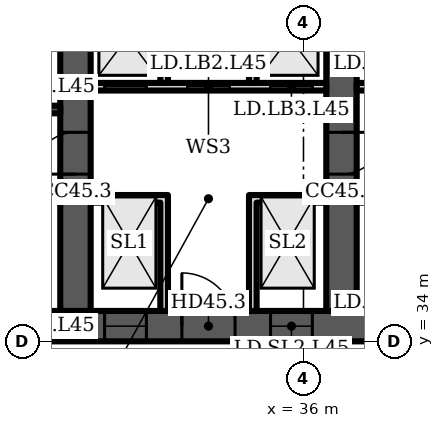
"""IFC4 building model, lengths in metres.
Left out: names, types, materials, properties, quantities, classifications, styles, units other than length and angle.
Written with IfcOpenShell. Run it as: python <this file> out.ifc"""

import sys

from ifc_helpers import new_model, si_unit, direction, frame, frame_2d, origin, place, context, subcontext, project, spatial, polyline, rectangle, outline, extrude, element, fill, save


model = new_model("IFC4")
c1 = context("Model", 3, precision=1e-05, world=origin(), true_north=direction((0.0, 1.0)))
c2 = subcontext(c1, "Body", "Model", "MODEL_VIEW")
j1 = project(units=[si_unit("LENGTHUNIT", "METRE"), si_unit("PLANEANGLEUNIT", "RADIAN")], contexts=[c1])
p1 = place(None, origin())
s1 = spatial("IfcSite", under=j1, at=p1, CompositionType="ELEMENT")
p2 = place(p1, origin())
s2 = spatial("IfcBuilding", under=s1, at=p2, CompositionType="ELEMENT")
p3 = place(p2, frame((0.0, 0.0, 184.3)))
s3 = spatial("IfcBuildingStorey", under=s2, at=p3, CompositionType="ELEMENT", Elevation=184.3)
p4 = place(p3, frame((16.0, 34.4, 0.0), z_axis=(0.0, 0.0, 1.0), x_axis=(1.0, 0.0, 0.0)))
e1 = element("IfcWall", 1, at=p4, inside=s3, PredefinedType="SHEAR", context=c2, shape_type="SweptSolid", body=[
    extrude(rectangle(XDim=42.0, YDim=0.8, at=frame_2d((21.0, 0.0))), origin(), (0.0, 0.0, 1.0), 3.6),
])
p5 = place(p4, frame((1.75, 0.0, 0.0)))
e2 = element("IfcOpeningElement", 2, at=p5, cuts=e1, PredefinedType="OPENING", context=c2, shape_type="SweptSolid", body=[
    extrude(rectangle(XDim=1.0, YDim=2.1, at=frame_2d((0.5, 1.05))), frame((0.0, 0.41, 0.0), z_axis=(0.0, -1.0, 0.0), x_axis=(1.0, 0.0, 0.0)), (0.0, 0.0, 1.0), 0.82),
])
p6 = place(p4, frame((4.65, 0.0, 0.0)))
e3 = element("IfcOpeningElement", 3, at=p6, cuts=e1, PredefinedType="OPENING", context=c2, shape_type="SweptSolid", body=[
    extrude(rectangle(XDim=1.0, YDim=2.1, at=frame_2d((0.5, 1.05))), frame((0.0, 0.41, 0.0), z_axis=(0.0, -1.0, 0.0), x_axis=(1.0, 0.0, 0.0)), (0.0, 0.0, 1.0), 0.82),
])
p7 = place(p4, frame((7.65, 0.0, 0.0)))
e4 = element("IfcOpeningElement", 4, at=p7, cuts=e1, PredefinedType="OPENING", context=c2, shape_type="SweptSolid", body=[
    extrude(rectangle(XDim=1.2, YDim=2.1, at=frame_2d((0.6, 1.05))), frame((0.0, 0.41, 0.0), z_axis=(0.0, -1.0, 0.0), x_axis=(1.0, 0.0, 0.0)), (0.0, 0.0, 1.0), 0.82),
])
p8 = place(p4, frame((14.767, 0.0, 0.0)))
e5 = element("IfcOpeningElement", 5, at=p8, cuts=e1, PredefinedType="OPENING", context=c2, shape_type="SweptSolid", body=[
    extrude(rectangle(XDim=1.1, YDim=2.1, at=frame_2d((0.55, 1.05))), frame((0.0, 0.41, 0.0), z_axis=(0.0, -1.0, 0.0), x_axis=(1.0, 0.0, 0.0)), (0.0, 0.0, 1.0), 0.82),
])
p9 = place(p4, frame((19.133, 0.0, 0.0)))
e6 = element("IfcOpeningElement", 6, at=p9, cuts=e1, PredefinedType="OPENING", context=c2, shape_type="SweptSolid", body=[
    extrude(rectangle(XDim=1.1, YDim=2.1, at=frame_2d((0.55, 1.05))), frame((0.0, 0.41, 0.0), z_axis=(0.0, -1.0, 0.0), x_axis=(1.0, 0.0, 0.0)), (0.0, 0.0, 1.0), 0.82),
])
p10 = place(p4, frame((16.8, 0.0, 0.0)))
e7 = element("IfcOpeningElement", 7, at=p10, cuts=e1, PredefinedType="OPENING", context=c2, shape_type="SweptSolid", body=[
    extrude(rectangle(XDim=1.4, YDim=2.1, at=frame_2d((0.7, 1.05))), frame((0.0, 0.41, 0.0), z_axis=(0.0, -1.0, 0.0), x_axis=(1.0, 0.0, 0.0)), (0.0, 0.0, 1.0), 0.82),
])
p11 = place(p4, frame((21.767, 0.0, 0.0)))
e8 = element("IfcOpeningElement", 8, at=p11, cuts=e1, PredefinedType="OPENING", context=c2, shape_type="SweptSolid", body=[
    extrude(rectangle(XDim=1.1, YDim=2.1, at=frame_2d((0.55, 1.05))), frame((0.0, 0.41, 0.0), z_axis=(0.0, -1.0, 0.0), x_axis=(1.0, 0.0, 0.0)), (0.0, 0.0, 1.0), 0.82),
])
p12 = place(p4, frame((23.95, 0.0, 0.0)))
e9 = element("IfcOpeningElement", 9, at=p12, cuts=e1, PredefinedType="OPENING", context=c2, shape_type="SweptSolid", body=[
    extrude(rectangle(XDim=1.1, YDim=2.1, at=frame_2d((0.55, 1.05))), frame((0.0, 0.41, 0.0), z_axis=(0.0, -1.0, 0.0), x_axis=(1.0, 0.0, 0.0)), (0.0, 0.0, 1.0), 0.82),
])
p13 = place(p4, frame((26.133, 0.0, 0.0)))
e10 = element("IfcOpeningElement", 10, at=p13, cuts=e1, PredefinedType="OPENING", context=c2, shape_type="SweptSolid", body=[
    extrude(rectangle(XDim=1.1, YDim=2.1, at=frame_2d((0.55, 1.05))), frame((0.0, 0.41, 0.0), z_axis=(0.0, -1.0, 0.0), x_axis=(1.0, 0.0, 0.0)), (0.0, 0.0, 1.0), 0.82),
])
p14 = place(p4, frame((33.15, 0.0, 0.0)))
e11 = element("IfcOpeningElement", 11, at=p14, cuts=e1, PredefinedType="OPENING", context=c2, shape_type="SweptSolid", body=[
    extrude(rectangle(XDim=1.2, YDim=2.1, at=frame_2d((0.6, 1.05))), frame((0.0, 0.41, 0.0), z_axis=(0.0, -1.0, 0.0), x_axis=(1.0, 0.0, 0.0)), (0.0, 0.0, 1.0), 0.82),
])
p15 = place(p4, frame((35.817, 0.0, 0.0)))
e12 = element("IfcOpeningElement", 12, at=p15, cuts=e1, PredefinedType="OPENING", context=c2, shape_type="SweptSolid", body=[
    extrude(rectangle(XDim=1.0, YDim=2.1, at=frame_2d((0.5, 1.05))), frame((0.0, 0.41, 0.0), z_axis=(0.0, -1.0, 0.0), x_axis=(1.0, 0.0, 0.0)), (0.0, 0.0, 1.0), 0.82),
])
p16 = place(p4, frame((39.95, 0.0, 0.0)))
e13 = element("IfcOpeningElement", 13, at=p16, cuts=e1, PredefinedType="OPENING", context=c2, shape_type="SweptSolid", body=[
    extrude(rectangle(XDim=1.0, YDim=2.1, at=frame_2d((0.5, 1.05))), frame((0.0, 0.41, 0.0), z_axis=(0.0, -1.0, 0.0), x_axis=(1.0, 0.0, 0.0)), (0.0, 0.0, 1.0), 0.82),
])
p17 = place(p4, frame((37.767, 0.0, 0.0)))
e14 = element("IfcOpeningElement", 14, at=p17, cuts=e1, PredefinedType="OPENING", context=c2, shape_type="SweptSolid", body=[
    extrude(rectangle(XDim=1.4, YDim=2.1, at=frame_2d((0.7, 1.05))), frame((0.0, 0.41, 0.0), z_axis=(0.0, -1.0, 0.0), x_axis=(1.0, 0.0, 0.0)), (0.0, 0.0, 1.0), 0.82),
])
p18 = place(p3, frame((30.0, 34.8, 0.0), z_axis=(0.0, 0.0, 1.0), x_axis=(0.0, 1.0, 0.0)))
e15 = element("IfcWall", 15, at=p18, inside=s3, PredefinedType="SHEAR", context=c2, shape_type="SweptSolid", body=[
    extrude(rectangle(XDim=14.374, YDim=0.8, at=frame_2d((7.187, 0.0))), origin(), (0.0, 0.0, 1.0), 3.6),
])
p19 = place(p18, frame((3.6, 0.0, 0.0)))
e16 = element("IfcOpeningElement", 16, at=p19, cuts=e15, PredefinedType="OPENING", context=c2, shape_type="SweptSolid", body=[
    extrude(rectangle(XDim=1.1, YDim=2.1, at=frame_2d((0.55, 1.05))), frame((0.0, 0.41, 0.0), z_axis=(0.0, -1.0, 0.0), x_axis=(1.0, 0.0, 0.0)), (0.0, 0.0, 1.0), 0.82),
])
p20 = place(p3, frame((37.0, 34.8, 0.0), z_axis=(0.0, 0.0, 1.0), x_axis=(0.0, 1.0, 0.0)))
e17 = element("IfcWall", 17, at=p20, inside=s3, PredefinedType="SHEAR", context=c2, shape_type="SweptSolid", body=[
    extrude(rectangle(XDim=14.987, YDim=0.8, at=frame_2d((7.493, 0.0))), origin(), (0.0, 0.0, 1.0), 3.6),
])
p21 = place(p20, frame((11.312, 0.0, 0.0)))
e18 = element("IfcOpeningElement", 18, at=p21, cuts=e17, PredefinedType="OPENING", context=c2, shape_type="SweptSolid", body=[
    extrude(rectangle(XDim=1.0, YDim=2.1, at=frame_2d((0.5, 1.05))), frame((0.0, 0.41, 0.0), z_axis=(0.0, -1.0, 0.0), x_axis=(1.0, 0.0, 0.0)), (0.0, 0.0, 1.0), 0.82),
])
p22 = place(p20, frame((3.6, 0.0, 0.0)))
e19 = element("IfcOpeningElement", 19, at=p22, cuts=e17, PredefinedType="OPENING", context=c2, shape_type="SweptSolid", body=[
    extrude(rectangle(XDim=1.1, YDim=2.1, at=frame_2d((0.55, 1.05))), frame((0.0, 0.41, 0.0), z_axis=(0.0, -1.0, 0.0), x_axis=(1.0, 0.0, 0.0)), (0.0, 0.0, 1.0), 0.82),
])
p23 = place(p3, frame((23.4, 40.1, 0.0), z_axis=(0.0, 0.0, 1.0), x_axis=(1.0, 0.0, 0.0)))
e20 = element("IfcWall", 20, at=p23, inside=s3, PredefinedType="SHEAR", context=c2, shape_type="SweptSolid", body=[
    extrude(rectangle(XDim=6.2, YDim=0.2, at=frame_2d((3.1, 0.0))), origin(), (0.0, 0.0, 1.0), 3.2),
])
p24 = place(p23, frame((3.525, 0.0, 0.0)))
e21 = element("IfcOpeningElement", 21, at=p24, cuts=e20, PredefinedType="OPENING", context=c2, shape_type="SweptSolid", body=[
    extrude(rectangle(XDim=1.2, YDim=2.1, at=frame_2d((0.6, 1.05))), frame((0.0, 0.11, 0.0), z_axis=(0.0, -1.0, 0.0), x_axis=(1.0, 0.0, 0.0)), (0.0, 0.0, 1.0), 0.22),
])
p25 = place(p23, frame((0.575, 0.0, 0.0)))
e22 = element("IfcOpeningElement", 22, at=p25, cuts=e20, PredefinedType="OPENING", context=c2, shape_type="SweptSolid", body=[
    extrude(rectangle(XDim=0.9, YDim=2.1, at=frame_2d((0.45, 1.05))), frame((0.0, 0.11, 0.0), z_axis=(0.0, -1.0, 0.0), x_axis=(1.0, 0.0, 0.0)), (0.0, 0.0, 1.0), 0.22),
])
p26 = place(p3, frame((30.4, 40.7, 0.0), z_axis=(0.0, 0.0, 1.0), x_axis=(1.0, 0.0, 0.0)))
e23 = element("IfcWall", 23, at=p26, inside=s3, PredefinedType="PARTITIONING", context=c2, shape_type="SweptSolid", body=[
    extrude(rectangle(XDim=6.2, YDim=0.2, at=frame_2d((3.1, 0.0))), origin(), (0.0, 0.0, 1.0), 3.2),
])
p27 = place(p26, frame((0.367, 0.0, 0.0)))
e24 = element("IfcOpeningElement", 24, at=p27, cuts=e23, PredefinedType="OPENING", context=c2, shape_type="SweptSolid", body=[
    extrude(rectangle(XDim=1.1, YDim=2.1, at=frame_2d((0.55, 1.05))), frame((0.0, 0.11, 0.0), z_axis=(0.0, -1.0, 0.0), x_axis=(1.0, 0.0, 0.0)), (0.0, 0.0, 1.0), 0.22),
])
p28 = place(p26, frame((2.55, 0.0, 0.0)))
e25 = element("IfcOpeningElement", 25, at=p28, cuts=e23, PredefinedType="OPENING", context=c2, shape_type="SweptSolid", body=[
    extrude(rectangle(XDim=1.1, YDim=2.1, at=frame_2d((0.55, 1.05))), frame((0.0, 0.11, 0.0), z_axis=(0.0, -1.0, 0.0), x_axis=(1.0, 0.0, 0.0)), (0.0, 0.0, 1.0), 0.22),
])
p29 = place(p26, frame((4.733, 0.0, 0.0)))
e26 = element("IfcOpeningElement", 26, at=p29, cuts=e23, PredefinedType="OPENING", context=c2, shape_type="SweptSolid", body=[
    extrude(rectangle(XDim=1.1, YDim=2.1, at=frame_2d((0.55, 1.05))), frame((0.0, 0.11, 0.0), z_axis=(0.0, -1.0, 0.0), x_axis=(1.0, 0.0, 0.0)), (0.0, 0.0, 1.0), 0.22),
])
p30 = place(p3, frame((0.0, 0.0, -0.0)))
e27 = element("IfcWall", 27, at=p30, inside=s3, PredefinedType="PARTITIONING", context=c2, shape_type="SweptSolid", body=[
    extrude(outline(polyline([(32.233, 37.65), (30.4, 37.65), (30.4, 37.85), (32.233, 37.85), (32.433, 37.85), (32.433, 34.8), (32.233, 34.8), (32.233, 37.65)])), origin(), (0.0, 0.0, 1.0), 3.2),
])
p31 = place(p3, frame((0.0, 0.0, -0.0)))
e28 = element("IfcWall", 28, at=p31, inside=s3, PredefinedType="PARTITIONING", context=c2, shape_type="SweptSolid", body=[
    extrude(outline(polyline([(34.567, 37.85), (34.767, 37.85), (36.6, 37.85), (36.6, 37.65), (34.767, 37.65), (34.767, 34.8), (34.567, 34.8), (34.567, 37.85)])), origin(), (0.0, 0.0, 1.0), 3.2),
])
p32 = place(p3, frame((0.0, 0.0, -0.0)))
e29 = element("IfcWall", 29, at=p32, inside=s3, PredefinedType="PARTITIONING", context=c2, shape_type="SweptSolid", body=[
    extrude(outline(polyline([(32.433, 40.8), (32.233, 40.8), (32.233, 43.8), (30.4, 43.8), (30.4, 44.0), (36.6, 44.0), (36.6, 43.8), (34.767, 43.8), (34.767, 40.8), (34.567, 40.8), (34.567, 43.8), (32.433, 43.8), (32.433, 40.8)])), origin(), (0.0, 0.0, 1.0), 3.2),
])
p33 = place(p3, frame((37.4, 40.7, 0.0), z_axis=(0.0, 0.0, 1.0), x_axis=(1.0, 0.0, 0.0)))
e30 = element("IfcWall", 30, at=p33, inside=s3, PredefinedType="PARTITIONING", context=c2, shape_type="SweptSolid", body=[
    extrude(rectangle(XDim=6.2, YDim=0.2, at=frame_2d((3.1, 0.0))), origin(), (0.0, 0.0, 1.0), 3.2),
])
p34 = place(p33, frame((0.367, 0.0, 0.0)))
e31 = element("IfcOpeningElement", 31, at=p34, cuts=e30, PredefinedType="OPENING", context=c2, shape_type="SweptSolid", body=[
    extrude(rectangle(XDim=1.1, YDim=2.1, at=frame_2d((0.55, 1.05))), frame((0.0, 0.11, 0.0), z_axis=(0.0, -1.0, 0.0), x_axis=(1.0, 0.0, 0.0)), (0.0, 0.0, 1.0), 0.22),
])
p35 = place(p33, frame((2.55, 0.0, 0.0)))
e32 = element("IfcOpeningElement", 32, at=p35, cuts=e30, PredefinedType="OPENING", context=c2, shape_type="SweptSolid", body=[
    extrude(rectangle(XDim=1.1, YDim=2.1, at=frame_2d((0.55, 1.05))), frame((0.0, 0.11, 0.0), z_axis=(0.0, -1.0, 0.0), x_axis=(1.0, 0.0, 0.0)), (0.0, 0.0, 1.0), 0.22),
])
p36 = place(p33, frame((4.733, 0.0, 0.0)))
e33 = element("IfcOpeningElement", 33, at=p36, cuts=e30, PredefinedType="OPENING", context=c2, shape_type="SweptSolid", body=[
    extrude(rectangle(XDim=1.1, YDim=2.1, at=frame_2d((0.55, 1.05))), frame((0.0, 0.11, 0.0), z_axis=(0.0, -1.0, 0.0), x_axis=(1.0, 0.0, 0.0)), (0.0, 0.0, 1.0), 0.22),
])
p37 = place(p3, frame((0.0, 0.0, -0.0)))
e34 = element("IfcWall", 34, at=p37, inside=s3, PredefinedType="PARTITIONING", context=c2, shape_type="SweptSolid", body=[
    extrude(outline(polyline([(41.567, 37.1), (39.433, 37.1), (39.433, 34.8), (39.233, 34.8), (39.233, 37.65), (37.4, 37.65), (37.4, 37.85), (39.233, 37.85), (39.433, 37.85), (39.433, 37.3), (41.567, 37.3), (41.567, 37.55), (41.767, 37.55), (43.6, 37.55), (43.6, 37.35), (41.767, 37.35), (41.767, 34.8), (41.567, 34.8), (41.567, 37.1)])), origin(), (0.0, 0.0, 1.0), 3.2),
])
p38 = place(p3, frame((0.0, 0.0, -0.0)))
e35 = element("IfcWall", 35, at=p38, inside=s3, PredefinedType="PARTITIONING", context=c2, shape_type="SweptSolid", body=[
    extrude(outline(polyline([(39.433, 40.8), (39.233, 40.8), (39.233, 43.8), (37.4, 43.8), (37.4, 44.0), (43.6, 44.0), (43.6, 43.8), (41.767, 43.8), (41.767, 40.8), (41.567, 40.8), (41.567, 43.8), (39.433, 43.8), (39.433, 40.8)])), origin(), (0.0, 0.0, 1.0), 3.2),
])
p39 = place(p3, frame((37.0, 30.5, 0.0), z_axis=(0.0, 0.0, 1.0), x_axis=(0.0, 1.0, 0.0)))
e36 = element("IfcWall", 36, at=p39, inside=s3, PredefinedType="PARTITIONING", context=c2, shape_type="SweptSolid", body=[
    extrude(rectangle(XDim=3.5, YDim=0.2, at=frame_2d((1.75, 0.0))), origin(), (0.0, 0.0, 1.0), 3.2),
])
p40 = place(p39, frame((1.2, 0.0, 0.0)))
e37 = element("IfcOpeningElement", 37, at=p40, cuts=e36, PredefinedType="OPENING", context=c2, shape_type="SweptSolid", body=[
    extrude(rectangle(XDim=1.1, YDim=2.1, at=frame_2d((0.55, 1.05))), frame((0.0, 0.11, 0.0), z_axis=(0.0, -1.0, 0.0), x_axis=(1.0, 0.0, 0.0)), (0.0, 0.0, 1.0), 0.22),
])
p41 = place(p8, origin())
e38 = element("IfcDoor", 38, at=p41, inside=s3, OperationType="DOUBLE_DOOR_SLIDING", PredefinedType="DOOR", context=c2, shape_type="SweptSolid", body=[
    extrude(rectangle(XDim=1.1, YDim=2.1, at=frame_2d((0.55, 1.05))), frame((0.0, 0.025, 0.0), z_axis=(0.0, -1.0, 0.0), x_axis=(1.0, 0.0, 0.0)), (0.0, 0.0, 1.0), 0.05),
])
fill(e5, e38)
p42 = place(p9, origin())
e39 = element("IfcDoor", 39, at=p42, inside=s3, OperationType="DOUBLE_DOOR_SLIDING", PredefinedType="DOOR", context=c2, shape_type="SweptSolid", body=[
    extrude(rectangle(XDim=1.1, YDim=2.1, at=frame_2d((0.55, 1.05))), frame((0.0, 0.025, 0.0), z_axis=(0.0, -1.0, 0.0), x_axis=(1.0, 0.0, 0.0)), (0.0, 0.0, 1.0), 0.05),
])
fill(e6, e39)
p43 = place(p10, origin())
e40 = element("IfcDoor", 40, at=p43, inside=s3, OperationType="DOUBLE_DOOR_SINGLE_SWING", PredefinedType="DOOR", context=c2, shape_type="SweptSolid", body=[
    extrude(rectangle(XDim=1.4, YDim=2.1, at=frame_2d((0.7, 1.05))), frame((0.0, 0.025, 0.0), z_axis=(0.0, -1.0, 0.0), x_axis=(1.0, 0.0, 0.0)), (0.0, 0.0, 1.0), 0.05),
])
fill(e7, e40)
p44 = place(p27, origin())
e41 = element("IfcDoor", 41, at=p44, inside=s3, OperationType="DOUBLE_DOOR_SLIDING", PredefinedType="DOOR", context=c2, shape_type="SweptSolid", body=[
    extrude(rectangle(XDim=1.1, YDim=2.1, at=frame_2d((0.55, 1.05))), frame((0.0, 0.025, 0.0), z_axis=(0.0, -1.0, 0.0), x_axis=(1.0, 0.0, 0.0)), (0.0, 0.0, 1.0), 0.05),
])
fill(e24, e41)
p45 = place(p28, origin())
e42 = element("IfcDoor", 42, at=p45, inside=s3, OperationType="DOUBLE_DOOR_SLIDING", PredefinedType="DOOR", context=c2, shape_type="SweptSolid", body=[
    extrude(rectangle(XDim=1.1, YDim=2.1, at=frame_2d((0.55, 1.05))), frame((0.0, 0.025, 0.0), z_axis=(0.0, -1.0, 0.0), x_axis=(1.0, 0.0, 0.0)), (0.0, 0.0, 1.0), 0.05),
])
fill(e25, e42)
p46 = place(p29, origin())
e43 = element("IfcDoor", 43, at=p46, inside=s3, OperationType="DOUBLE_DOOR_SLIDING", PredefinedType="DOOR", context=c2, shape_type="SweptSolid", body=[
    extrude(rectangle(XDim=1.1, YDim=2.1, at=frame_2d((0.55, 1.05))), frame((0.0, 0.025, 0.0), z_axis=(0.0, -1.0, 0.0), x_axis=(1.0, 0.0, 0.0)), (0.0, 0.0, 1.0), 0.05),
])
fill(e26, e43)
p47 = place(p19, origin())
e44 = element("IfcDoor", 44, at=p47, inside=s3, OperationType="SINGLE_SWING_LEFT", PredefinedType="DOOR", context=c2, shape_type="SweptSolid", body=[
    extrude(rectangle(XDim=1.1, YDim=2.1, at=frame_2d((0.55, 1.05))), frame((0.0, 0.025, 0.0), z_axis=(0.0, -1.0, 0.0), x_axis=(1.0, 0.0, 0.0)), (0.0, 0.0, 1.0), 0.05),
])
fill(e16, e44)
p48 = place(p22, origin())
e45 = element("IfcDoor", 45, at=p48, inside=s3, OperationType="SINGLE_SWING_RIGHT", PredefinedType="DOOR", context=c2, shape_type="SweptSolid", body=[
    extrude(rectangle(XDim=1.1, YDim=2.1, at=frame_2d((0.55, 1.05))), frame((0.0, 0.025, 0.0), z_axis=(0.0, -1.0, 0.0), x_axis=(1.0, 0.0, 0.0)), (0.0, 0.0, 1.0), 0.05),
])
fill(e19, e45)
save(model, sys.argv[1])
